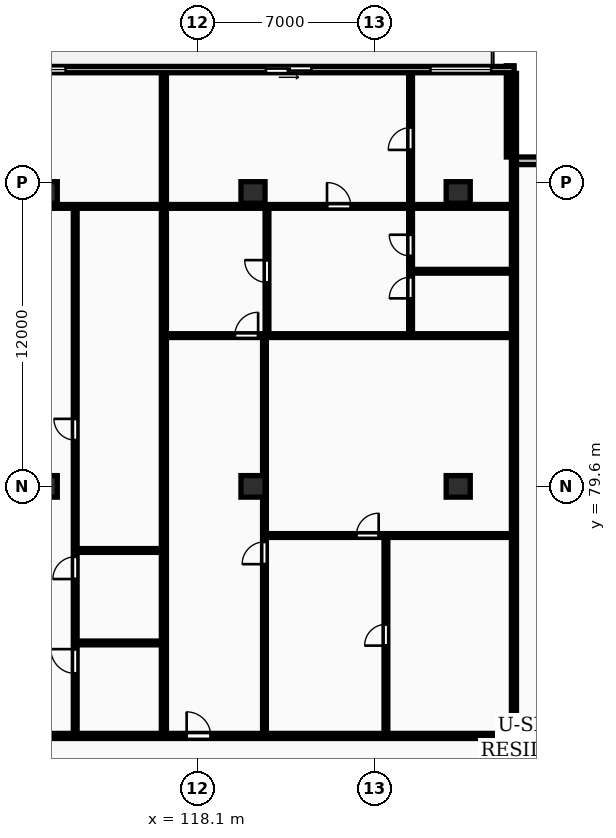
"""IFC4 building model, lengths in metres.
Left out: names, types, materials, properties, quantities, classifications, styles, units other than length and angle.
Written with IfcOpenShell. Run it as: python <this file> out.ifc"""

import sys

from ifc_helpers import new_model, si_unit, direction, frame, frame_2d, origin, origin_2d, place, context, subcontext, project, spatial, rectangle, extrude, element, fill, save


model = new_model("IFC4")
c1 = context("Model", 3, precision=1e-05, world=origin(), true_north=direction((0.0, 1.0)))
c2 = subcontext(c1, "Body", "Model", "MODEL_VIEW")
j1 = project(units=[si_unit("LENGTHUNIT", "METRE"), si_unit("PLANEANGLEUNIT", "RADIAN")], contexts=[c1])
p1 = place(None, origin())
s1 = spatial("IfcSite", under=j1, at=p1, CompositionType="ELEMENT")
p2 = place(p1, origin())
s2 = spatial("IfcBuilding", under=s1, at=p2, CompositionType="ELEMENT")
p3 = place(p2, frame((0.0, 0.0, 93.8)))
s3 = spatial("IfcBuildingStorey", under=s2, at=p3, CompositionType="ELEMENT", Elevation=93.8)
for number, where, z_axis, x_axis in (
    (1, (112.1, 79.6, 0.0), (0.0, 0.0, 1.0), (1.0, 0.0, 0.0)),
    (2, (112.1, 91.2, 0.0), (0.0, 0.0, 1.0), (1.0, 0.0, 0.0)),
    (3, (120.3, 79.6, 0.0), (0.0, 0.0, 1.0), (1.0, 0.0, 0.0)),
    (4, (120.3, 91.2, 0.0), (0.0, 0.0, 1.0), (1.0, 0.0, 0.0)),
    (5, (128.4, 79.6, 0.0), (0.0, 0.0, 1.0), (1.0, 0.0, 0.0)),
    (6, (128.4, 91.2, 0.0), (0.0, 0.0, 1.0), (1.0, 0.0, 0.0)),
):
    element("IfcColumn", number, at=place(p3, frame(where, z_axis=z_axis, x_axis=x_axis)), inside=s3, PredefinedType="COLUMN", context=c2, shape_type="SweptSolid", body=[
        extrude(rectangle(XDim=0.95, YDim=0.85, at=origin_2d()), origin(), (0.0, 0.0, 1.0), 3.25),
    ])
for number, where, z_axis, x_axis in (
    (7, (134.2, 92.45, 0.0), (0.0, 0.0, 1.0), (-1.0, 0.0, 0.0)),
    (8, (130.45, 92.6, 0.0), (0.0, 0.0, 1.0), (0.0, 1.0, 0.0)),
):
    element("IfcWall", number, at=place(p3, frame(where, z_axis=z_axis, x_axis=x_axis)), inside=s3, PredefinedType="STANDARD", context=c2, shape_type="SweptSolid", body=[
        extrude(rectangle(XDim=3.6, YDim=0.3, at=frame_2d((1.8, 0.0))), origin(), (0.0, 0.0, 1.0), 2.97),
    ])
p4 = place(p3, frame((130.6, 96.05, 0.0), z_axis=(0.0, 0.0, 1.0), x_axis=(-1.0, 0.0, 0.0)))
e9 = element("IfcWall", 9, at=p4, inside=s3, PredefinedType="STANDARD", context=c2, shape_type="SweptSolid", body=[
    extrude(rectangle(XDim=73.0, YDim=0.25, at=frame_2d((36.5, 0.0))), origin(), (0.0, 0.0, 1.0), 2.97),
])
p5 = place(p4, frame((67.768, 0.0, 0.0)))
e10 = element("IfcOpeningElement", 10, at=p5, cuts=e9, PredefinedType="OPENING", context=c2, shape_type="SweptSolid", body=[
    extrude(rectangle(XDim=1.8, YDim=2.2, at=frame_2d((0.9, 1.1))), frame((0.0, 0.135, 0.0), z_axis=(0.0, -1.0, 0.0), x_axis=(1.0, 0.0, 0.0)), (0.0, 0.0, 1.0), 0.27),
])
p6 = place(p4, frame((57.624, 0.0, 0.85)))
e11 = element("IfcOpeningElement", 11, at=p6, cuts=e9, PredefinedType="OPENING", context=c2, shape_type="SweptSolid", body=[
    extrude(rectangle(XDim=2.4, YDim=1.9, at=frame_2d((1.2, 0.95))), frame((0.0, 0.135, 0.0), z_axis=(0.0, -1.0, 0.0), x_axis=(1.0, 0.0, 0.0)), (0.0, 0.0, 1.0), 0.27),
])
p7 = place(p4, frame((47.257, 0.0, 0.0)))
e12 = element("IfcOpeningElement", 12, at=p7, cuts=e9, PredefinedType="OPENING", context=c2, shape_type="SweptSolid", body=[
    extrude(rectangle(XDim=1.8, YDim=2.2, at=frame_2d((0.9, 1.1))), frame((0.0, 0.135, 0.0), z_axis=(0.0, -1.0, 0.0), x_axis=(1.0, 0.0, 0.0)), (0.0, 0.0, 1.0), 0.27),
])
p8 = place(p4, frame((36.062, 0.0, 0.85)))
e13 = element("IfcOpeningElement", 13, at=p8, cuts=e9, PredefinedType="OPENING", context=c2, shape_type="SweptSolid", body=[
    extrude(rectangle(XDim=2.4, YDim=1.9, at=frame_2d((1.2, 0.95))), frame((0.0, 0.135, 0.0), z_axis=(0.0, -1.0, 0.0), x_axis=(1.0, 0.0, 0.0)), (0.0, 0.0, 1.0), 0.27),
])
p9 = place(p4, frame((26.486, 0.0, 0.0)))
e14 = element("IfcOpeningElement", 14, at=p9, cuts=e9, PredefinedType="OPENING", context=c2, shape_type="SweptSolid", body=[
    extrude(rectangle(XDim=1.8, YDim=2.2, at=frame_2d((0.9, 1.1))), frame((0.0, 0.135, 0.0), z_axis=(0.0, -1.0, 0.0), x_axis=(1.0, 0.0, 0.0)), (0.0, 0.0, 1.0), 0.27),
])
p10 = place(p4, frame((17.694, 0.0, 0.85)))
e15 = element("IfcOpeningElement", 15, at=p10, cuts=e9, PredefinedType="OPENING", context=c2, shape_type="SweptSolid", body=[
    extrude(rectangle(XDim=2.4, YDim=1.9, at=frame_2d((1.2, 0.95))), frame((0.0, 0.135, 0.0), z_axis=(0.0, -1.0, 0.0), x_axis=(1.0, 0.0, 0.0)), (0.0, 0.0, 1.0), 0.27),
])
p11 = place(p4, frame((7.989, 0.0, 0.0)))
e16 = element("IfcOpeningElement", 16, at=p11, cuts=e9, PredefinedType="OPENING", context=c2, shape_type="SweptSolid", body=[
    extrude(rectangle(XDim=1.8, YDim=2.2, at=frame_2d((0.9, 1.1))), frame((0.0, 0.135, 0.0), z_axis=(0.0, -1.0, 0.0), x_axis=(1.0, 0.0, 0.0)), (0.0, 0.0, 1.0), 0.27),
])
p12 = place(p4, frame((0.9, 0.0, 0.85)))
e17 = element("IfcOpeningElement", 17, at=p12, cuts=e9, PredefinedType="OPENING", context=c2, shape_type="SweptSolid", body=[
    extrude(rectangle(XDim=2.4, YDim=1.9, at=frame_2d((1.2, 0.95))), frame((0.0, 0.135, 0.0), z_axis=(0.0, -1.0, 0.0), x_axis=(1.0, 0.0, 0.0)), (0.0, 0.0, 1.0), 0.27),
])
for number, where, z_axis, x_axis in (
    (18, (130.6, 69.83, 0.0), (0.0, 0.0, 1.0), (0.0, 1.0, 0.0)),
    (19, (116.783, 69.83, 0.0), (0.0, 0.0, 1.0), (0.0, 1.0, 0.0)),
):
    element("IfcWall", number, at=place(p3, frame(where, z_axis=z_axis, x_axis=x_axis)), inside=s3, PredefinedType="PARTITIONING", context=c2, shape_type="SweptSolid", body=[
        extrude(rectangle(XDim=26.07, YDim=0.2, at=frame_2d((13.035, 0.0))), origin(), (0.0, 0.0, 1.0), 2.97),
    ])
p13 = place(p3, frame((113.343, 73.42, 0.0), z_axis=(0.0, 0.0, 1.0), x_axis=(1.0, 0.0, 0.0)))
e20 = element("IfcWall", 20, at=p13, inside=s3, PredefinedType="PARTITIONING", context=c2, shape_type="SweptSolid", body=[
    extrude(rectangle(XDim=3.36, YDim=0.15, at=frame_2d((1.68, 0.0))), origin(), (0.0, 0.0, 1.0), 2.561),
])
p14 = place(p3, frame((113.343, 77.07, 0.0), z_axis=(0.0, 0.0, 1.0), x_axis=(1.0, 0.0, 0.0)))
e21 = element("IfcWall", 21, at=p14, inside=s3, PredefinedType="PARTITIONING", context=c2, shape_type="SweptSolid", body=[
    extrude(rectangle(XDim=3.36, YDim=0.15, at=frame_2d((1.68, 0.0))), origin(), (0.0, 0.0, 1.0), 2.97),
])
p15 = place(p3, frame((113.283, 69.81, 0.0), z_axis=(0.0, 0.0, 1.0), x_axis=(0.0, 1.0, 0.0)))
e22 = element("IfcWall", 22, at=p15, inside=s3, PredefinedType="PARTITIONING", context=c2, shape_type="SweptSolid", body=[
    extrude(rectangle(XDim=20.78, YDim=0.15, at=frame_2d((10.39, 0.0))), origin(), (0.0, 0.0, 1.0), 2.97),
])
p16 = place(p15, frame((2.406, 0.0, 0.0)))
e23 = element("IfcOpeningElement", 23, at=p16, cuts=e22, PredefinedType="OPENING", context=c2, shape_type="SweptSolid", body=[
    extrude(rectangle(XDim=0.96, YDim=2.1, at=frame_2d((0.48, 1.05))), frame((0.0, 0.085, 0.0), z_axis=(0.0, -1.0, 0.0), x_axis=(1.0, 0.0, 0.0)), (0.0, 0.0, 1.0), 0.17),
])
p17 = place(p15, frame((6.133, 0.0, 0.0)))
e24 = element("IfcOpeningElement", 24, at=p17, cuts=e22, PredefinedType="OPENING", context=c2, shape_type="SweptSolid", body=[
    extrude(rectangle(XDim=0.88, YDim=2.06, at=frame_2d((0.44, 1.03))), frame((0.0, 0.085, 0.0), z_axis=(0.0, -1.0, 0.0), x_axis=(1.0, 0.0, 0.0)), (0.0, 0.0, 1.0), 0.17),
])
p18 = place(p15, frame((11.615, 0.0, 0.0)))
e25 = element("IfcOpeningElement", 25, at=p18, cuts=e22, PredefinedType="OPENING", context=c2, shape_type="SweptSolid", body=[
    extrude(rectangle(XDim=0.84, YDim=2.04, at=frame_2d((0.42, 1.02))), frame((0.0, 0.085, 0.0), z_axis=(0.0, -1.0, 0.0), x_axis=(1.0, 0.0, 0.0)), (0.0, 0.0, 1.0), 0.17),
])
p19 = place(p3, frame((99.638, 90.65, 0.0), z_axis=(0.0, 0.0, 1.0), x_axis=(1.0, 0.0, 0.0)))
e26 = element("IfcWall", 26, at=p19, inside=s3, PredefinedType="PARTITIONING", context=c2, shape_type="SweptSolid", body=[
    extrude(rectangle(XDim=17.065, YDim=0.15, at=frame_2d((8.532, 0.0))), origin(), (0.0, 0.0, 1.0), 2.97),
])
p20 = place(p19, frame((5.922, 0.0, 0.0)))
e27 = element("IfcOpeningElement", 27, at=p20, cuts=e26, PredefinedType="OPENING", context=c2, shape_type="SweptSolid", body=[
    extrude(rectangle(XDim=0.94, YDim=2.1, at=frame_2d((0.47, 1.05))), frame((0.0, 0.085, 0.0), z_axis=(0.0, -1.0, 0.0), x_axis=(1.0, 0.0, 0.0)), (0.0, 0.0, 1.0), 0.17),
])
p21 = place(p19, frame((8.062, 0.0, 0.0)))
e28 = element("IfcOpeningElement", 28, at=p21, cuts=e26, PredefinedType="OPENING", context=c2, shape_type="SweptSolid", body=[
    extrude(rectangle(XDim=0.94, YDim=2.1, at=frame_2d((0.47, 1.05))), frame((0.0, 0.085, 0.0), z_axis=(0.0, -1.0, 0.0), x_axis=(1.0, 0.0, 0.0)), (0.0, 0.0, 1.0), 0.17),
])
p22 = place(p3, frame((125.546, 69.81, 0.0), z_axis=(0.0, 0.0, 1.0), x_axis=(0.0, 1.0, 0.0)))
e29 = element("IfcWall", 29, at=p22, inside=s3, PredefinedType="PARTITIONING", context=c2, shape_type="SweptSolid", body=[
    extrude(rectangle(XDim=7.85, YDim=0.15, at=frame_2d((3.925, 0.0))), origin(), (0.0, 0.0, 1.0), 2.97),
])
p23 = place(p22, frame((3.505, 0.0, 0.0)))
e30 = element("IfcOpeningElement", 30, at=p23, cuts=e29, PredefinedType="OPENING", context=c2, shape_type="SweptSolid", body=[
    extrude(rectangle(XDim=0.84, YDim=2.04, at=frame_2d((0.42, 1.02))), frame((0.0, 0.085, 0.0), z_axis=(0.0, -1.0, 0.0), x_axis=(1.0, 0.0, 0.0)), (0.0, 0.0, 1.0), 0.17),
])
p24 = place(p3, frame((120.813, 77.66, 0.0), z_axis=(0.0, 0.0, 1.0), x_axis=(1.0, 0.0, 0.0)))
e31 = element("IfcWall", 31, at=p24, inside=s3, PredefinedType="PARTITIONING", context=c2, shape_type="SweptSolid", body=[
    extrude(rectangle(XDim=9.707, YDim=0.15, at=frame_2d((4.854, 0.0))), origin(), (0.0, 0.0, 1.0), 2.97),
])
p25 = place(p24, frame((3.568, 0.0, 0.0)))
e32 = element("IfcOpeningElement", 32, at=p25, cuts=e31, PredefinedType="OPENING", context=c2, shape_type="SweptSolid", body=[
    extrude(rectangle(XDim=0.88, YDim=2.06, at=frame_2d((0.44, 1.03))), frame((0.0, 0.085, 0.0), z_axis=(0.0, -1.0, 0.0), x_axis=(1.0, 0.0, 0.0)), (0.0, 0.0, 1.0), 0.17),
])
p26 = place(p3, frame((120.753, 69.81, 0.0), z_axis=(0.0, 0.0, 1.0), x_axis=(0.0, 1.0, 0.0)))
e33 = element("IfcWall", 33, at=p26, inside=s3, PredefinedType="PARTITIONING", context=c2, shape_type="SweptSolid", body=[
    extrude(rectangle(XDim=15.7, YDim=0.15, at=frame_2d((7.85, 0.0))), origin(), (0.0, 0.0, 1.0), 2.97),
])
p27 = place(p26, frame((6.72, 0.0, 0.0)))
e34 = element("IfcOpeningElement", 34, at=p27, cuts=e33, PredefinedType="OPENING", context=c2, shape_type="SweptSolid", body=[
    extrude(rectangle(XDim=0.88, YDim=2.06, at=frame_2d((0.44, 1.03))), frame((0.0, 0.085, 0.0), z_axis=(0.0, -1.0, 0.0), x_axis=(1.0, 0.0, 0.0)), (0.0, 0.0, 1.0), 0.17),
])
p28 = place(p3, frame((120.853, 85.59, 0.0), z_axis=(0.0, 0.0, 1.0), x_axis=(0.0, 1.0, 0.0)))
e35 = element("IfcWall", 35, at=p28, inside=s3, PredefinedType="PARTITIONING", context=c2, shape_type="SweptSolid", body=[
    extrude(rectangle(XDim=5.0, YDim=0.15, at=frame_2d((2.5, 0.0))), origin(), (0.0, 0.0, 1.0), 2.97),
])
p29 = place(p28, frame((2.06, 0.0, 0.0)))
e36 = element("IfcOpeningElement", 36, at=p29, cuts=e35, PredefinedType="OPENING", context=c2, shape_type="SweptSolid", body=[
    extrude(rectangle(XDim=0.88, YDim=2.06, at=frame_2d((0.44, 1.03))), frame((0.0, 0.085, 0.0), z_axis=(0.0, -1.0, 0.0), x_axis=(1.0, 0.0, 0.0)), (0.0, 0.0, 1.0), 0.17),
])
p30 = place(p3, frame((126.58, 88.09, 0.0), z_axis=(0.0, 0.0, 1.0), x_axis=(1.0, 0.0, 0.0)))
e37 = element("IfcWall", 37, at=p30, inside=s3, PredefinedType="PARTITIONING", context=c2, shape_type="SweptSolid", body=[
    extrude(rectangle(XDim=3.94, YDim=0.15, at=frame_2d((1.97, 0.0))), origin(), (0.0, 0.0, 1.0), 2.97),
])
p31 = place(p3, frame((126.52, 85.59, 0.0), z_axis=(0.0, 0.0, 1.0), x_axis=(0.0, 1.0, 0.0)))
e38 = element("IfcWall", 38, at=p31, inside=s3, PredefinedType="PARTITIONING", context=c2, shape_type="SweptSolid", body=[
    extrude(rectangle(XDim=10.31, YDim=0.15, at=frame_2d((5.155, 0.0))), origin(), (0.0, 0.0, 1.0), 2.97),
])
p32 = place(p31, frame((1.43, 0.0, 0.0)))
e39 = element("IfcOpeningElement", 39, at=p32, cuts=e38, PredefinedType="OPENING", context=c2, shape_type="SweptSolid", body=[
    extrude(rectangle(XDim=0.84, YDim=2.04, at=frame_2d((0.42, 1.02))), frame((0.0, 0.085, 0.0), z_axis=(0.0, -1.0, 0.0), x_axis=(1.0, 0.0, 0.0)), (0.0, 0.0, 1.0), 0.17),
])
p33 = place(p31, frame((3.102, 0.0, 0.0)))
e40 = element("IfcOpeningElement", 40, at=p33, cuts=e38, PredefinedType="OPENING", context=c2, shape_type="SweptSolid", body=[
    extrude(rectangle(XDim=0.84, YDim=2.04, at=frame_2d((0.42, 1.02))), frame((0.0, 0.085, 0.0), z_axis=(0.0, -1.0, 0.0), x_axis=(1.0, 0.0, 0.0)), (0.0, 0.0, 1.0), 0.17),
])
p34 = place(p31, frame((7.29, 0.0, 0.0)))
e41 = element("IfcOpeningElement", 41, at=p34, cuts=e38, PredefinedType="OPENING", context=c2, shape_type="SweptSolid", body=[
    extrude(rectangle(XDim=0.88, YDim=2.06, at=frame_2d((0.44, 1.03))), frame((0.0, 0.085, 0.0), z_axis=(0.0, -1.0, 0.0), x_axis=(1.0, 0.0, 0.0)), (0.0, 0.0, 1.0), 0.17),
])
p35 = place(p3, frame((116.863, 85.55, 0.0), z_axis=(0.0, 0.0, 1.0), x_axis=(1.0, 0.0, 0.0)))
e42 = element("IfcWall", 42, at=p35, inside=s3, PredefinedType="PARTITIONING", context=c2, shape_type="SweptSolid", body=[
    extrude(rectangle(XDim=13.657, YDim=0.15, at=frame_2d((6.829, 0.0))), origin(), (0.0, 0.0, 1.0), 2.561),
])
p36 = place(p35, frame((2.72, 0.0, 0.0)))
e43 = element("IfcOpeningElement", 43, at=p36, cuts=e42, PredefinedType="OPENING", context=c2, shape_type="SweptSolid", body=[
    extrude(rectangle(XDim=0.92, YDim=2.08, at=frame_2d((0.46, 1.04))), frame((0.0, 0.085, 0.0), z_axis=(0.0, -1.0, 0.0), x_axis=(1.0, 0.0, 0.0)), (0.0, 0.0, 1.0), 0.17),
])
p37 = place(p3, frame((116.863, 90.65, 0.0), z_axis=(0.0, 0.0, 1.0), x_axis=(1.0, 0.0, 0.0)))
e44 = element("IfcWall", 44, at=p37, inside=s3, PredefinedType="PARTITIONING", context=c2, shape_type="SweptSolid", body=[
    extrude(rectangle(XDim=13.657, YDim=0.15, at=frame_2d((6.829, 0.0))), origin(), (0.0, 0.0, 1.0), 2.97),
])
p38 = place(p37, frame((6.359, 0.0, 0.0)))
e45 = element("IfcOpeningElement", 45, at=p38, cuts=e44, PredefinedType="OPENING", context=c2, shape_type="SweptSolid", body=[
    extrude(rectangle(XDim=0.94, YDim=2.1, at=frame_2d((0.47, 1.05))), frame((0.0, 0.085, 0.0), z_axis=(0.0, -1.0, 0.0), x_axis=(1.0, 0.0, 0.0)), (0.0, 0.0, 1.0), 0.17),
])
p39 = place(p3, frame((57.6, 69.75, 0.0), z_axis=(0.0, 0.0, 1.0), x_axis=(1.0, 0.0, 0.0)))
e46 = element("IfcWall", 46, at=p39, inside=s3, PredefinedType="PARTITIONING", context=c2, shape_type="SweptSolid", body=[
    extrude(rectangle(XDim=73.0, YDim=0.2, at=frame_2d((36.5, 0.0))), origin(), (0.0, 0.0, 1.0), 2.97),
])
p40 = place(p39, frame((7.372, 0.0, 0.0)))
e47 = element("IfcOpeningElement", 47, at=p40, cuts=e46, PredefinedType="OPENING", context=c2, shape_type="SweptSolid", body=[
    extrude(rectangle(XDim=1.22, YDim=2.18, at=frame_2d((0.61, 1.09))), frame((0.0, 0.11, 0.0), z_axis=(0.0, -1.0, 0.0), x_axis=(1.0, 0.0, 0.0)), (0.0, 0.0, 1.0), 0.22),
])
p41 = place(p39, frame((29.368, 0.0, 0.0)))
e48 = element("IfcOpeningElement", 48, at=p41, cuts=e46, PredefinedType="OPENING", context=c2, shape_type="SweptSolid", body=[
    extrude(rectangle(XDim=1.22, YDim=2.18, at=frame_2d((0.61, 1.09))), frame((0.0, 0.11, 0.0), z_axis=(0.0, -1.0, 0.0), x_axis=(1.0, 0.0, 0.0)), (0.0, 0.0, 1.0), 0.22),
])
p42 = place(p39, frame((48.88, 0.0, 0.0)))
e49 = element("IfcOpeningElement", 49, at=p42, cuts=e46, PredefinedType="OPENING", context=c2, shape_type="SweptSolid", body=[
    extrude(rectangle(XDim=1.22, YDim=2.18, at=frame_2d((0.61, 1.09))), frame((0.0, 0.11, 0.0), z_axis=(0.0, -1.0, 0.0), x_axis=(1.0, 0.0, 0.0)), (0.0, 0.0, 1.0), 0.22),
])
p43 = place(p39, frame((60.081, 0.0, 0.0)))
e50 = element("IfcOpeningElement", 50, at=p43, cuts=e46, PredefinedType="OPENING", context=c2, shape_type="SweptSolid", body=[
    extrude(rectangle(XDim=0.95, YDim=2.15, at=frame_2d((0.475, 1.075))), frame((0.0, 0.11, 0.0), z_axis=(0.0, -1.0, 0.0), x_axis=(1.0, 0.0, 0.0)), (0.0, 0.0, 1.0), 0.22),
])
p44 = place(p10, origin())
e51 = element("IfcWindow", 51, at=p44, inside=s3, PartitioningType="DOUBLE_PANEL_VERTICAL", PredefinedType="WINDOW", context=c2, shape_type="SweptSolid", body=[
    extrude(rectangle(XDim=2.4, YDim=1.9, at=frame_2d((1.2, 0.95))), frame((0.0, 0.03, 0.0), z_axis=(0.0, -1.0, 0.0), x_axis=(1.0, 0.0, 0.0)), (0.0, 0.0, 1.0), 0.06),
])
fill(e15, e51)
p45 = place(p11, origin())
e52 = element("IfcDoor", 52, at=p45, inside=s3, OperationType="SLIDING_TO_LEFT", PredefinedType="DOOR", context=c2, shape_type="SweptSolid", body=[
    extrude(rectangle(XDim=1.8, YDim=2.2, at=frame_2d((0.9, 1.1))), frame((0.0, 0.025, 0.0), z_axis=(0.0, -1.0, 0.0), x_axis=(1.0, 0.0, 0.0)), (0.0, 0.0, 1.0), 0.05),
])
fill(e16, e52)
p46 = place(p12, origin())
e53 = element("IfcWindow", 53, at=p46, inside=s3, PartitioningType="DOUBLE_PANEL_VERTICAL", PredefinedType="WINDOW", context=c2, shape_type="SweptSolid", body=[
    extrude(rectangle(XDim=2.4, YDim=1.9, at=frame_2d((1.2, 0.95))), frame((0.0, 0.03, 0.0), z_axis=(0.0, -1.0, 0.0), x_axis=(1.0, 0.0, 0.0)), (0.0, 0.0, 1.0), 0.06),
])
fill(e17, e53)
p47 = place(p16, origin())
e54 = element("IfcDoor", 54, at=p47, inside=s3, OperationType="SINGLE_SWING_RIGHT", PredefinedType="DOOR", context=c2, shape_type="SweptSolid", body=[
    extrude(rectangle(XDim=0.96, YDim=2.1, at=frame_2d((0.48, 1.05))), frame((0.0, 0.025, 0.0), z_axis=(0.0, -1.0, 0.0), x_axis=(1.0, 0.0, 0.0)), (0.0, 0.0, 1.0), 0.05),
])
fill(e23, e54)
p48 = place(p17, origin())
e55 = element("IfcDoor", 55, at=p48, inside=s3, OperationType="SINGLE_SWING_LEFT", PredefinedType="DOOR", context=c2, shape_type="SweptSolid", body=[
    extrude(rectangle(XDim=0.88, YDim=2.06, at=frame_2d((0.44, 1.03))), frame((0.0, 0.025, 0.0), z_axis=(0.0, -1.0, 0.0), x_axis=(1.0, 0.0, 0.0)), (0.0, 0.0, 1.0), 0.05),
])
fill(e24, e55)
p49 = place(p18, origin())
e56 = element("IfcDoor", 56, at=p49, inside=s3, OperationType="SINGLE_SWING_RIGHT", PredefinedType="DOOR", context=c2, shape_type="SweptSolid", body=[
    extrude(rectangle(XDim=0.84, YDim=2.04, at=frame_2d((0.42, 1.02))), frame((0.0, 0.025, 0.0), z_axis=(0.0, -1.0, 0.0), x_axis=(1.0, 0.0, 0.0)), (0.0, 0.0, 1.0), 0.05),
])
fill(e25, e56)
p50 = place(p23, origin())
e57 = element("IfcDoor", 57, at=p50, inside=s3, OperationType="SINGLE_SWING_LEFT", PredefinedType="DOOR", context=c2, shape_type="SweptSolid", body=[
    extrude(rectangle(XDim=0.84, YDim=2.04, at=frame_2d((0.42, 1.02))), frame((0.0, 0.025, 0.0), z_axis=(0.0, -1.0, 0.0), x_axis=(1.0, 0.0, 0.0)), (0.0, 0.0, 1.0), 0.05),
])
fill(e30, e57)
p51 = place(p25, origin())
e58 = element("IfcDoor", 58, at=p51, inside=s3, OperationType="SINGLE_SWING_RIGHT", PredefinedType="DOOR", context=c2, shape_type="SweptSolid", body=[
    extrude(rectangle(XDim=0.88, YDim=2.06, at=frame_2d((0.44, 1.03))), frame((0.0, 0.025, 0.0), z_axis=(0.0, -1.0, 0.0), x_axis=(1.0, 0.0, 0.0)), (0.0, 0.0, 1.0), 0.05),
])
fill(e32, e58)
p52 = place(p27, origin())
e59 = element("IfcDoor", 59, at=p52, inside=s3, OperationType="SINGLE_SWING_LEFT", PredefinedType="DOOR", context=c2, shape_type="SweptSolid", body=[
    extrude(rectangle(XDim=0.88, YDim=2.06, at=frame_2d((0.44, 1.03))), frame((0.0, 0.025, 0.0), z_axis=(0.0, -1.0, 0.0), x_axis=(1.0, 0.0, 0.0)), (0.0, 0.0, 1.0), 0.05),
])
fill(e34, e59)
p53 = place(p29, origin())
e60 = element("IfcDoor", 60, at=p53, inside=s3, OperationType="SINGLE_SWING_RIGHT", PredefinedType="DOOR", context=c2, shape_type="SweptSolid", body=[
    extrude(rectangle(XDim=0.88, YDim=2.06, at=frame_2d((0.44, 1.03))), frame((0.0, 0.025, 0.0), z_axis=(0.0, -1.0, 0.0), x_axis=(1.0, 0.0, 0.0)), (0.0, 0.0, 1.0), 0.05),
])
fill(e36, e60)
p54 = place(p32, origin())
e61 = element("IfcDoor", 61, at=p54, inside=s3, OperationType="SINGLE_SWING_LEFT", PredefinedType="DOOR", context=c2, shape_type="SweptSolid", body=[
    extrude(rectangle(XDim=0.84, YDim=2.04, at=frame_2d((0.42, 1.02))), frame((0.0, 0.025, 0.0), z_axis=(0.0, -1.0, 0.0), x_axis=(1.0, 0.0, 0.0)), (0.0, 0.0, 1.0), 0.05),
])
fill(e39, e61)
p55 = place(p33, origin())
e62 = element("IfcDoor", 62, at=p55, inside=s3, OperationType="SINGLE_SWING_RIGHT", PredefinedType="DOOR", context=c2, shape_type="SweptSolid", body=[
    extrude(rectangle(XDim=0.84, YDim=2.04, at=frame_2d((0.42, 1.02))), frame((0.0, 0.025, 0.0), z_axis=(0.0, -1.0, 0.0), x_axis=(1.0, 0.0, 0.0)), (0.0, 0.0, 1.0), 0.05),
])
fill(e40, e62)
p56 = place(p34, origin())
e63 = element("IfcDoor", 63, at=p56, inside=s3, OperationType="SINGLE_SWING_LEFT", PredefinedType="DOOR", context=c2, shape_type="SweptSolid", body=[
    extrude(rectangle(XDim=0.88, YDim=2.06, at=frame_2d((0.44, 1.03))), frame((0.0, 0.025, 0.0), z_axis=(0.0, -1.0, 0.0), x_axis=(1.0, 0.0, 0.0)), (0.0, 0.0, 1.0), 0.05),
])
fill(e41, e63)
p57 = place(p36, origin())
e64 = element("IfcDoor", 64, at=p57, inside=s3, OperationType="SINGLE_SWING_RIGHT", PredefinedType="DOOR", context=c2, shape_type="SweptSolid", body=[
    extrude(rectangle(XDim=0.92, YDim=2.08, at=frame_2d((0.46, 1.04))), frame((0.0, 0.025, 0.0), z_axis=(0.0, -1.0, 0.0), x_axis=(1.0, 0.0, 0.0)), (0.0, 0.0, 1.0), 0.05),
])
fill(e43, e64)
p58 = place(p38, origin())
e65 = element("IfcDoor", 65, at=p58, inside=s3, OperationType="SINGLE_SWING_LEFT", PredefinedType="DOOR", context=c2, shape_type="SweptSolid", body=[
    extrude(rectangle(XDim=0.94, YDim=2.1, at=frame_2d((0.47, 1.05))), frame((0.0, 0.025, 0.0), z_axis=(0.0, -1.0, 0.0), x_axis=(1.0, 0.0, 0.0)), (0.0, 0.0, 1.0), 0.05),
])
fill(e45, e65)
p59 = place(p43, origin())
e66 = element("IfcDoor", 66, at=p59, inside=s3, OperationType="SINGLE_SWING_LEFT", PredefinedType="DOOR", context=c2, shape_type="SweptSolid", body=[
    extrude(rectangle(XDim=0.95, YDim=2.15, at=frame_2d((0.475, 1.075))), frame((0.0, 0.025, 0.0), z_axis=(0.0, -1.0, 0.0), x_axis=(1.0, 0.0, 0.0)), (0.0, 0.0, 1.0), 0.05),
])
fill(e50, e66)
save(model, sys.argv[1])
